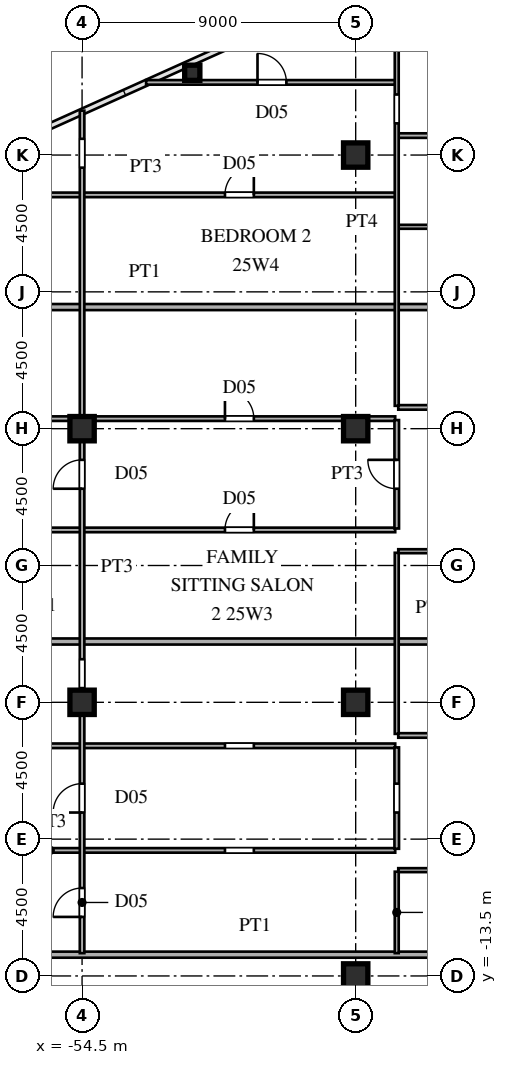
"""IFC4 building model, lengths in metres.
Left out: names, types, materials, properties, quantities, classifications, styles, units other than length and angle.
Written with IfcOpenShell. Run it as: python <this file> out.ifc"""

import sys

from ifc_helpers import new_model, si_unit, direction, frame, frame_2d, origin, origin_2d, place, context, subcontext, project, spatial, rectangle, hollow_rectangle, i_section, extrude, source, transform, mapped, element, fill, save


model = new_model("IFC4")
c1 = context("Model", 3, precision=1e-05, world=origin(), true_north=direction((0.0, 1.0)))
c2 = subcontext(c1, "Body", "Model", "MODEL_VIEW")
j1 = project(units=[si_unit("LENGTHUNIT", "METRE"), si_unit("PLANEANGLEUNIT", "RADIAN")], contexts=[c1])
p1 = place(None, origin())
s1 = spatial("IfcSite", under=j1, at=p1, CompositionType="ELEMENT")
p2 = place(p1, origin())
s2 = spatial("IfcBuilding", under=s1, at=p2, CompositionType="ELEMENT")
p3 = place(p2, frame((0.0, 0.0, 96.0)))
s3 = spatial("IfcBuildingStorey", under=s2, at=p3, CompositionType="ELEMENT", Elevation=96.0)
m1 = source(origin(), c2, "Body", "SweptSolid", [
    extrude(i_section(OverallWidth=0.8, OverallDepth=0.8, WebThickness=0.032, FlangeThickness=0.05, at=origin_2d()), origin(), (0.0, 0.0, 1.0), 3.6),
])
for number, where, z_axis, x_axis in (
    (1, (-45.5, -13.5, 0.0), (0.0, 0.0, 1.0), (1.0, 0.0, 0.0)),
    (2, (-45.5, -4.5, 0.0), (0.0, 0.0, 1.0), (1.0, 0.0, 0.0)),
    (3, (-45.5, 4.5, 0.0), (0.0, 0.0, 1.0), (1.0, 0.0, 0.0)),
    (4, (-45.5, 13.5, 0.0), (0.0, 0.0, 1.0), (1.0, 0.0, 0.0)),
    (5, (-54.5, -4.5, 0.0), (0.0, 0.0, 1.0), (1.0, 0.0, 0.0)),
    (6, (-54.5, 4.5, 0.0), (0.0, 0.0, 1.0), (1.0, 0.0, 0.0)),
):
    element("IfcColumn", number, at=place(p3, frame(where, z_axis=z_axis, x_axis=x_axis)), inside=s3, PredefinedType="COLUMN", context=c2, shape_type="MappedRepresentation", body=[
        mapped(m1, transform((0.0, 0.0, 0.0), scale=1.0)),
    ])
m2 = source(origin(), c2, "Body", "SweptSolid", [
    extrude(hollow_rectangle(XDim=0.5, YDim=0.5, WallThickness=0.02, at=origin_2d()), origin(), (0.0, 0.0, 1.0), 3.6),
])
p4 = place(p3, frame((-50.875, 16.205, 0.0), z_axis=(0.0, 0.0, 1.0), x_axis=(1.0, 0.0, 0.0)))
e7 = element("IfcColumn", 7, at=p4, inside=s3, PredefinedType="COLUMN", context=c2, shape_type="MappedRepresentation", body=[
    mapped(m2, transform((0.0, 0.0, 0.0), scale=1.0)),
])
p5 = place(p3, frame((-59.234, -12.8, 0.0), z_axis=(0.0, 0.0, 1.0), x_axis=(1.0, 0.0, 0.0)))
e8 = element("IfcWall", 8, at=p5, inside=s3, PredefinedType="PARTITIONING", context=c2, shape_type="SweptSolid", body=[
    extrude(rectangle(XDim=20.854, YDim=0.2, at=frame_2d((10.427, 0.0))), origin(), (0.0, 0.0, 1.0), 3.38),
])
p6 = place(p3, frame((-44.1, -10.02, 0.0), z_axis=(0.0, 0.0, 1.0), x_axis=(1.0, 0.0, 0.0)))
e9 = element("IfcWall", 9, at=p6, inside=s3, PredefinedType="PARTITIONING", context=c2, shape_type="SweptSolid", body=[
    extrude(rectangle(XDim=5.75, YDim=0.13, at=frame_2d((2.875, 0.0))), origin(), (0.0, 0.0, 1.0), 3.38),
])
p7 = place(p6, frame((2.435, 0.0, 0.0)))
e10 = element("IfcOpeningElement", 10, at=p7, cuts=e9, PredefinedType="OPENING", context=c2, shape_type="SweptSolid", body=[
    extrude(rectangle(XDim=0.88, YDim=2.1, at=frame_2d((0.44, 1.05))), frame((0.0, 0.075, 0.0), z_axis=(0.0, -1.0, 0.0), x_axis=(1.0, 0.0, 0.0)), (0.0, 0.0, 1.0), 0.15),
])
p8 = place(p3, frame((-66.887, -9.37, 0.0), z_axis=(0.0, 0.0, 1.0), x_axis=(1.0, 0.0, 0.0)))
e11 = element("IfcWall", 11, at=p8, inside=s3, PredefinedType="PARTITIONING", context=c2, shape_type="SweptSolid", body=[
    extrude(rectangle(XDim=22.687, YDim=0.15, at=frame_2d((11.344, 0.0))), origin(), (0.0, 0.0, 1.0), 3.38),
])
p9 = place(p8, frame((17.087, 0.0, 0.0)))
e12 = element("IfcOpeningElement", 12, at=p9, cuts=e11, PredefinedType="OPENING", context=c2, shape_type="SweptSolid", body=[
    extrude(rectangle(XDim=0.95, YDim=2.15, at=frame_2d((0.475, 1.075))), frame((0.0, 0.085, 0.0), z_axis=(0.0, -1.0, 0.0), x_axis=(1.0, 0.0, 0.0)), (0.0, 0.0, 1.0), 0.17),
])
p10 = place(p3, frame((-71.035, -5.93, 0.0), z_axis=(0.0, 0.0, 1.0), x_axis=(1.0, 0.0, 0.0)))
e13 = element("IfcWall", 13, at=p10, inside=s3, PredefinedType="PARTITIONING", context=c2, shape_type="SweptSolid", body=[
    extrude(rectangle(XDim=26.835, YDim=0.15, at=frame_2d((13.417, 0.0))), origin(), (0.0, 0.0, 1.0), 3.38),
])
p11 = place(p10, frame((21.235, 0.0, 0.0)))
e14 = element("IfcOpeningElement", 14, at=p11, cuts=e13, PredefinedType="OPENING", context=c2, shape_type="SweptSolid", body=[
    extrude(rectangle(XDim=0.95, YDim=2.15, at=frame_2d((0.475, 1.075))), frame((0.0, 0.085, 0.0), z_axis=(0.0, -1.0, 0.0), x_axis=(1.0, 0.0, 0.0)), (0.0, 0.0, 1.0), 0.17),
])
p12 = place(p3, frame((-44.1, -5.59, 0.0), z_axis=(0.0, 0.0, 1.0), x_axis=(1.0, 0.0, 0.0)))
e15 = element("IfcWall", 15, at=p12, inside=s3, PredefinedType="PARTITIONING", context=c2, shape_type="SweptSolid", body=[
    extrude(rectangle(XDim=5.75, YDim=0.15, at=frame_2d((2.875, 0.0))), origin(), (0.0, 0.0, 1.0), 3.38),
])
p13 = place(p12, frame((2.4, 0.0, 0.0)))
e16 = element("IfcOpeningElement", 16, at=p13, cuts=e15, PredefinedType="OPENING", context=c2, shape_type="SweptSolid", body=[
    extrude(rectangle(XDim=0.95, YDim=2.15, at=frame_2d((0.475, 1.075))), frame((0.0, 0.085, 0.0), z_axis=(0.0, -1.0, 0.0), x_axis=(1.0, 0.0, 0.0)), (0.0, 0.0, 1.0), 0.17),
])
p14 = place(p3, frame((-71.005, -2.5, 0.0), z_axis=(0.0, 0.0, 1.0), x_axis=(1.0, 0.0, 0.0)))
e17 = element("IfcWall", 17, at=p14, inside=s3, PredefinedType="PARTITIONING", context=c2, shape_type="SweptSolid", body=[
    extrude(rectangle(XDim=32.625, YDim=0.2, at=frame_2d((16.312, 0.0))), origin(), (0.0, 0.0, 1.0), 3.38),
])
p15 = place(p3, frame((-44.1, 0.47, 0.0), z_axis=(0.0, 0.0, 1.0), x_axis=(1.0, 0.0, 0.0)))
e18 = element("IfcWall", 18, at=p15, inside=s3, PredefinedType="PARTITIONING", context=c2, shape_type="SweptSolid", body=[
    extrude(rectangle(XDim=5.75, YDim=0.13, at=frame_2d((2.875, 0.0))), origin(), (0.0, 0.0, 1.0), 3.38),
])
p16 = place(p15, frame((2.435, 0.0, 0.0)))
e19 = element("IfcOpeningElement", 19, at=p16, cuts=e18, PredefinedType="OPENING", context=c2, shape_type="SweptSolid", body=[
    extrude(rectangle(XDim=0.88, YDim=2.1, at=frame_2d((0.44, 1.05))), frame((0.0, 0.075, 0.0), z_axis=(0.0, -1.0, 0.0), x_axis=(1.0, 0.0, 0.0)), (0.0, 0.0, 1.0), 0.15),
])
p17 = place(p3, frame((-71.035, 1.17, 0.0), z_axis=(0.0, 0.0, 1.0), x_axis=(1.0, 0.0, 0.0)))
e20 = element("IfcWall", 20, at=p17, inside=s3, PredefinedType="PARTITIONING", context=c2, shape_type="SweptSolid", body=[
    extrude(rectangle(XDim=26.835, YDim=0.15, at=frame_2d((13.417, 0.0))), origin(), (0.0, 0.0, 1.0), 3.38),
])
p18 = place(p17, frame((21.235, 0.0, 0.0)))
e21 = element("IfcOpeningElement", 21, at=p18, cuts=e20, PredefinedType="OPENING", context=c2, shape_type="SweptSolid", body=[
    extrude(rectangle(XDim=0.95, YDim=2.15, at=frame_2d((0.475, 1.075))), frame((0.0, 0.085, 0.0), z_axis=(0.0, -1.0, 0.0), x_axis=(1.0, 0.0, 0.0)), (0.0, 0.0, 1.0), 0.17),
])
p19 = place(p17, frame((13.21, 0.0, 0.0)))
e22 = element("IfcOpeningElement", 22, at=p19, cuts=e20, PredefinedType="OPENING", context=c2, shape_type="SweptSolid", body=[
    extrude(rectangle(XDim=0.95, YDim=2.15, at=frame_2d((0.475, 1.075))), frame((0.0, 0.085, 0.0), z_axis=(0.0, -1.0, 0.0), x_axis=(1.0, 0.0, 0.0)), (0.0, 0.0, 1.0), 0.17),
])
p20 = place(p3, frame((-71.035, 4.83, 0.0), z_axis=(0.0, 0.0, 1.0), x_axis=(1.0, 0.0, 0.0)))
e23 = element("IfcWall", 23, at=p20, inside=s3, PredefinedType="PARTITIONING", context=c2, shape_type="SweptSolid", body=[
    extrude(rectangle(XDim=26.835, YDim=0.15, at=frame_2d((13.417, 0.0))), origin(), (0.0, 0.0, 1.0), 3.38),
])
p21 = place(p20, frame((21.235, 0.0, 0.0)))
e24 = element("IfcOpeningElement", 24, at=p21, cuts=e23, PredefinedType="OPENING", context=c2, shape_type="SweptSolid", body=[
    extrude(rectangle(XDim=0.95, YDim=2.15, at=frame_2d((0.475, 1.075))), frame((0.0, 0.085, 0.0), z_axis=(0.0, -1.0, 0.0), x_axis=(1.0, 0.0, 0.0)), (0.0, 0.0, 1.0), 0.17),
])
p22 = place(p20, frame((13.21, 0.0, 0.0)))
e25 = element("IfcOpeningElement", 25, at=p22, cuts=e23, PredefinedType="OPENING", context=c2, shape_type="SweptSolid", body=[
    extrude(rectangle(XDim=0.95, YDim=2.15, at=frame_2d((0.475, 1.075))), frame((0.0, 0.085, 0.0), z_axis=(0.0, -1.0, 0.0), x_axis=(1.0, 0.0, 0.0)), (0.0, 0.0, 1.0), 0.17),
])
p23 = place(p3, frame((-44.1, 5.2, 0.0), z_axis=(0.0, 0.0, 1.0), x_axis=(1.0, 0.0, 0.0)))
e26 = element("IfcWall", 26, at=p23, inside=s3, PredefinedType="PARTITIONING", context=c2, shape_type="SweptSolid", body=[
    extrude(rectangle(XDim=5.75, YDim=0.15, at=frame_2d((2.875, 0.0))), origin(), (0.0, 0.0, 1.0), 3.38),
])
p24 = place(p23, frame((2.4, 0.0, 0.0)))
e27 = element("IfcOpeningElement", 27, at=p24, cuts=e26, PredefinedType="OPENING", context=c2, shape_type="SweptSolid", body=[
    extrude(rectangle(XDim=0.95, YDim=2.15, at=frame_2d((0.475, 1.075))), frame((0.0, 0.085, 0.0), z_axis=(0.0, -1.0, 0.0), x_axis=(1.0, 0.0, 0.0)), (0.0, 0.0, 1.0), 0.17),
])
p25 = place(p3, frame((-68.79, 8.5, 0.0), z_axis=(0.0, 0.0, 1.0), x_axis=(1.0, 0.0, 0.0)))
e28 = element("IfcWall", 28, at=p25, inside=s3, PredefinedType="PARTITIONING", context=c2, shape_type="SweptSolid", body=[
    extrude(rectangle(XDim=30.41, YDim=0.2, at=frame_2d((15.205, 0.0))), origin(), (0.0, 0.0, 1.0), 3.38),
])
p26 = place(p3, frame((-44.1, 11.14, 0.0), z_axis=(0.0, 0.0, 1.0), x_axis=(1.0, 0.0, 0.0)))
e29 = element("IfcWall", 29, at=p26, inside=s3, PredefinedType="PARTITIONING", context=c2, shape_type="SweptSolid", body=[
    extrude(rectangle(XDim=5.75, YDim=0.13, at=frame_2d((2.875, 0.0))), origin(), (0.0, 0.0, 1.0), 3.38),
])
p27 = place(p26, frame((2.435, 0.0, 0.0)))
e30 = element("IfcOpeningElement", 30, at=p27, cuts=e29, PredefinedType="OPENING", context=c2, shape_type="SweptSolid", body=[
    extrude(rectangle(XDim=0.88, YDim=2.1, at=frame_2d((0.44, 1.05))), frame((0.0, 0.075, 0.0), z_axis=(0.0, -1.0, 0.0), x_axis=(1.0, 0.0, 0.0)), (0.0, 0.0, 1.0), 0.15),
])
p28 = place(p3, frame((-60.603, 12.19, 0.0), z_axis=(0.0, 0.0, 1.0), x_axis=(1.0, 0.0, 0.0)))
e31 = element("IfcWall", 31, at=p28, inside=s3, PredefinedType="PARTITIONING", context=c2, shape_type="SweptSolid", body=[
    extrude(rectangle(XDim=16.403, YDim=0.15, at=frame_2d((8.202, 0.0))), origin(), (0.0, 0.0, 1.0), 3.38),
])
p29 = place(p28, frame((10.803, 0.0, 0.0)))
e32 = element("IfcOpeningElement", 32, at=p29, cuts=e31, PredefinedType="OPENING", context=c2, shape_type="SweptSolid", body=[
    extrude(rectangle(XDim=0.95, YDim=2.15, at=frame_2d((0.475, 1.075))), frame((0.0, 0.085, 0.0), z_axis=(0.0, -1.0, 0.0), x_axis=(1.0, 0.0, 0.0)), (0.0, 0.0, 1.0), 0.17),
])
p30 = place(p28, frame((2.594, 0.0, 0.0)))
e33 = element("IfcOpeningElement", 33, at=p30, cuts=e31, PredefinedType="OPENING", context=c2, shape_type="SweptSolid", body=[
    extrude(rectangle(XDim=0.95, YDim=2.15, at=frame_2d((0.475, 1.075))), frame((0.0, 0.085, 0.0), z_axis=(0.0, -1.0, 0.0), x_axis=(1.0, 0.0, 0.0)), (0.0, 0.0, 1.0), 0.17),
])
p31 = place(p3, frame((-44.1, 14.14, 0.0), z_axis=(0.0, 0.0, 1.0), x_axis=(1.0, 0.0, 0.0)))
e34 = element("IfcWall", 34, at=p31, inside=s3, PredefinedType="PARTITIONING", context=c2, shape_type="SweptSolid", body=[
    extrude(rectangle(XDim=5.75, YDim=0.15, at=frame_2d((2.875, 0.0))), origin(), (0.0, 0.0, 1.0), 3.38),
])
p32 = place(p31, frame((2.4, 0.0, 0.0)))
e35 = element("IfcOpeningElement", 35, at=p32, cuts=e34, PredefinedType="OPENING", context=c2, shape_type="SweptSolid", body=[
    extrude(rectangle(XDim=0.95, YDim=2.15, at=frame_2d((0.475, 1.075))), frame((0.0, 0.085, 0.0), z_axis=(0.0, -1.0, 0.0), x_axis=(1.0, 0.0, 0.0)), (0.0, 0.0, 1.0), 0.17),
])
p33 = place(p3, frame((-52.394, 15.89, 0.0), z_axis=(0.0, 0.0, 1.0), x_axis=(1.0, 0.0, 0.0)))
e36 = element("IfcWall", 36, at=p33, inside=s3, PredefinedType="PARTITIONING", context=c2, shape_type="SweptSolid", body=[
    extrude(rectangle(XDim=8.194, YDim=0.15, at=frame_2d((4.097, 0.0))), origin(), (0.0, 0.0, 1.0), 3.38),
])
p34 = place(p33, frame((3.664, 0.0, 0.0)))
e37 = element("IfcOpeningElement", 37, at=p34, cuts=e36, PredefinedType="OPENING", context=c2, shape_type="SweptSolid", body=[
    extrude(rectangle(XDim=0.95, YDim=2.15, at=frame_2d((0.475, 1.075))), frame((0.0, 0.085, 0.0), z_axis=(0.0, -1.0, 0.0), x_axis=(1.0, 0.0, 0.0)), (0.0, 0.0, 1.0), 0.17),
])
p35 = place(p3, frame((-54.5, -12.75, 0.0), z_axis=(0.0, 0.0, 1.0), x_axis=(0.0, 1.0, 0.0)))
e38 = element("IfcWall", 38, at=p35, inside=s3, PredefinedType="PARTITIONING", context=c2, shape_type="SweptSolid", body=[
    extrude(rectangle(XDim=27.71, YDim=0.15, at=frame_2d((13.855, 0.0))), origin(), (0.0, 0.0, 1.0), 2.68),
])
p36 = place(p35, frame((4.625, 0.0, 0.0)))
e39 = element("IfcOpeningElement", 39, at=p36, cuts=e38, PredefinedType="OPENING", context=c2, shape_type="SweptSolid", body=[
    extrude(rectangle(XDim=0.95, YDim=2.15, at=frame_2d((0.475, 1.075))), frame((0.0, 0.085, 0.0), z_axis=(0.0, -1.0, 0.0), x_axis=(1.0, 0.0, 0.0)), (0.0, 0.0, 1.0), 0.17),
])
p37 = place(p35, frame((1.192, 0.0, 0.0)))
e40 = element("IfcOpeningElement", 40, at=p37, cuts=e38, PredefinedType="OPENING", context=c2, shape_type="SweptSolid", body=[
    extrude(rectangle(XDim=0.95, YDim=2.15, at=frame_2d((0.475, 1.075))), frame((0.0, 0.085, 0.0), z_axis=(0.0, -1.0, 0.0), x_axis=(1.0, 0.0, 0.0)), (0.0, 0.0, 1.0), 0.17),
])
p38 = place(p35, frame((8.717, 0.0, 0.0)))
e41 = element("IfcOpeningElement", 41, at=p38, cuts=e38, PredefinedType="OPENING", context=c2, shape_type="SweptSolid", body=[
    extrude(rectangle(XDim=0.95, YDim=2.15, at=frame_2d((0.475, 1.075))), frame((0.0, 0.085, 0.0), z_axis=(0.0, -1.0, 0.0), x_axis=(1.0, 0.0, 0.0)), (0.0, 0.0, 1.0), 0.17),
])
p39 = place(p35, frame((15.275, 0.0, 0.0)))
e42 = element("IfcOpeningElement", 42, at=p39, cuts=e38, PredefinedType="OPENING", context=c2, shape_type="SweptSolid", body=[
    extrude(rectangle(XDim=0.95, YDim=2.15, at=frame_2d((0.475, 1.075))), frame((0.0, 0.085, 0.0), z_axis=(0.0, -1.0, 0.0), x_axis=(1.0, 0.0, 0.0)), (0.0, 0.0, 1.0), 0.17),
])
p40 = place(p35, frame((25.835, 0.0, 0.0)))
e43 = element("IfcOpeningElement", 43, at=p40, cuts=e38, PredefinedType="OPENING", context=c2, shape_type="SweptSolid", body=[
    extrude(rectangle(XDim=0.95, YDim=2.15, at=frame_2d((0.475, 1.075))), frame((0.0, 0.085, 0.0), z_axis=(0.0, -1.0, 0.0), x_axis=(1.0, 0.0, 0.0)), (0.0, 0.0, 1.0), 0.17),
])
p41 = place(p3, frame((-44.15, -12.75, 0.0), z_axis=(0.0, 0.0, 1.0), x_axis=(0.0, 1.0, 0.0)))
e44 = element("IfcWall", 44, at=p41, inside=s3, PredefinedType="PARTITIONING", context=c2, shape_type="SweptSolid", body=[
    extrude(rectangle(XDim=2.679, YDim=0.13, at=frame_2d((1.339, 0.0))), origin(), (0.0, 0.0, 1.0), 3.38),
])
p42 = place(p3, frame((-44.15, -9.317, 0.0), z_axis=(0.0, 0.0, 1.0), x_axis=(0.0, 1.0, 0.0)))
e45 = element("IfcWall", 45, at=p42, inside=s3, PredefinedType="PARTITIONING", context=c2, shape_type="SweptSolid", body=[
    extrude(rectangle(XDim=3.334, YDim=0.15, at=frame_2d((1.667, 0.0))), origin(), (0.0, 0.0, 1.0), 3.38),
])
p43 = place(p42, frame((1.192, 0.0, 0.0)))
e46 = element("IfcOpeningElement", 46, at=p43, cuts=e45, PredefinedType="OPENING", context=c2, shape_type="SweptSolid", body=[
    extrude(rectangle(XDim=0.95, YDim=2.15, at=frame_2d((0.475, 1.075))), frame((0.0, 0.085, 0.0), z_axis=(0.0, -1.0, 0.0), x_axis=(1.0, 0.0, 0.0)), (0.0, 0.0, 1.0), 0.17),
])
p44 = place(p3, frame((-44.15, -5.538, 0.0), z_axis=(0.0, 0.0, 1.0), x_axis=(0.0, 1.0, 0.0)))
e47 = element("IfcWall", 47, at=p44, inside=s3, PredefinedType="PARTITIONING", context=c2, shape_type="SweptSolid", body=[
    extrude(rectangle(XDim=5.956, YDim=0.13, at=frame_2d((2.978, 0.0))), origin(), (0.0, 0.0, 1.0), 3.38),
])
p45 = place(p3, frame((-44.15, 1.217, 0.0), z_axis=(0.0, 0.0, 1.0), x_axis=(0.0, 1.0, 0.0)))
e48 = element("IfcWall", 48, at=p45, inside=s3, PredefinedType="PARTITIONING", context=c2, shape_type="SweptSolid", body=[
    extrude(rectangle(XDim=3.566, YDim=0.15, at=frame_2d((1.783, 0.0))), origin(), (0.0, 0.0, 1.0), 3.38),
])
p46 = place(p45, frame((1.308, 0.0, 0.0)))
e49 = element("IfcOpeningElement", 49, at=p46, cuts=e48, PredefinedType="OPENING", context=c2, shape_type="SweptSolid", body=[
    extrude(rectangle(XDim=0.95, YDim=2.15, at=frame_2d((0.475, 1.075))), frame((0.0, 0.085, 0.0), z_axis=(0.0, -1.0, 0.0), x_axis=(1.0, 0.0, 0.0)), (0.0, 0.0, 1.0), 0.17),
])
p47 = place(p3, frame((-44.15, 5.252, 0.0), z_axis=(0.0, 0.0, 1.0), x_axis=(0.0, 1.0, 0.0)))
e50 = element("IfcWall", 50, at=p47, inside=s3, PredefinedType="PARTITIONING", context=c2, shape_type="SweptSolid", body=[
    extrude(rectangle(XDim=14.365, YDim=0.13, at=frame_2d((7.183, 0.0))), origin(), (0.0, 0.0, 1.0), 3.38),
])
p48 = place(p47, frame((9.29, 0.0, 0.0)))
e51 = element("IfcOpeningElement", 51, at=p48, cuts=e50, PredefinedType="OPENING", context=c2, shape_type="SweptSolid", body=[
    extrude(rectangle(XDim=0.95, YDim=2.15, at=frame_2d((0.475, 1.075))), frame((0.0, 0.075, 0.0), z_axis=(0.0, -1.0, 0.0), x_axis=(1.0, 0.0, 0.0)), (0.0, 0.0, 1.0), 0.15),
])
m3 = source(origin(), c2, "Body", "SweptSolid", [
    extrude(rectangle(XDim=0.95, YDim=2.15, at=frame_2d((0.475, 1.075))), frame((0.0, 0.025, 0.0), z_axis=(0.0, -1.0, 0.0), x_axis=(1.0, 0.0, 0.0)), (0.0, 0.0, 1.0), 0.05),
])
p49 = place(p18, origin())
e52 = element("IfcDoor", 52, at=p49, inside=s3, OperationType="SINGLE_SWING_RIGHT", PredefinedType="DOOR", context=c2, shape_type="MappedRepresentation", body=[
    mapped(m3, transform((0.0, 0.0, 0.0), scale=1.0)),
])
fill(e21, e52)
p50 = place(p21, origin())
e53 = element("IfcDoor", 53, at=p50, inside=s3, OperationType="SINGLE_SWING_LEFT", PredefinedType="DOOR", context=c2, shape_type="MappedRepresentation", body=[
    mapped(m3, transform((0.0, 0.0, 0.0), scale=1.0)),
])
fill(e24, e53)
p51 = place(p29, origin())
e54 = element("IfcDoor", 54, at=p51, inside=s3, OperationType="SINGLE_SWING_RIGHT", PredefinedType="DOOR", context=c2, shape_type="MappedRepresentation", body=[
    mapped(m3, transform((0.0, 0.0, 0.0), scale=1.0)),
])
fill(e32, e54)
p52 = place(p34, origin())
e55 = element("IfcDoor", 55, at=p52, inside=s3, OperationType="SINGLE_SWING_LEFT", PredefinedType="DOOR", context=c2, shape_type="MappedRepresentation", body=[
    mapped(m3, transform((0.0, 0.0, 0.0), scale=1.0)),
])
fill(e37, e55)
p53 = place(p36, origin())
e56 = element("IfcDoor", 56, at=p53, inside=s3, OperationType="SINGLE_SWING_LEFT", PredefinedType="DOOR", context=c2, shape_type="MappedRepresentation", body=[
    mapped(m3, transform((0.0, 0.0, 0.0), scale=1.0)),
])
fill(e39, e56)
p54 = place(p37, origin())
e57 = element("IfcDoor", 57, at=p54, inside=s3, OperationType="SINGLE_SWING_LEFT", PredefinedType="DOOR", context=c2, shape_type="MappedRepresentation", body=[
    mapped(m3, transform((0.0, 0.0, 0.0), scale=1.0)),
])
fill(e40, e57)
p55 = place(p39, origin())
e58 = element("IfcDoor", 58, at=p55, inside=s3, OperationType="SINGLE_SWING_LEFT", PredefinedType="DOOR", context=c2, shape_type="MappedRepresentation", body=[
    mapped(m3, transform((0.0, 0.0, 0.0), scale=1.0)),
])
fill(e42, e58)
p56 = place(p46, origin())
e59 = element("IfcDoor", 59, at=p56, inside=s3, OperationType="SINGLE_SWING_RIGHT", PredefinedType="DOOR", context=c2, shape_type="MappedRepresentation", body=[
    mapped(m3, transform((0.0, 0.0, 0.0), scale=1.0)),
])
fill(e49, e59)
save(model, sys.argv[1])
